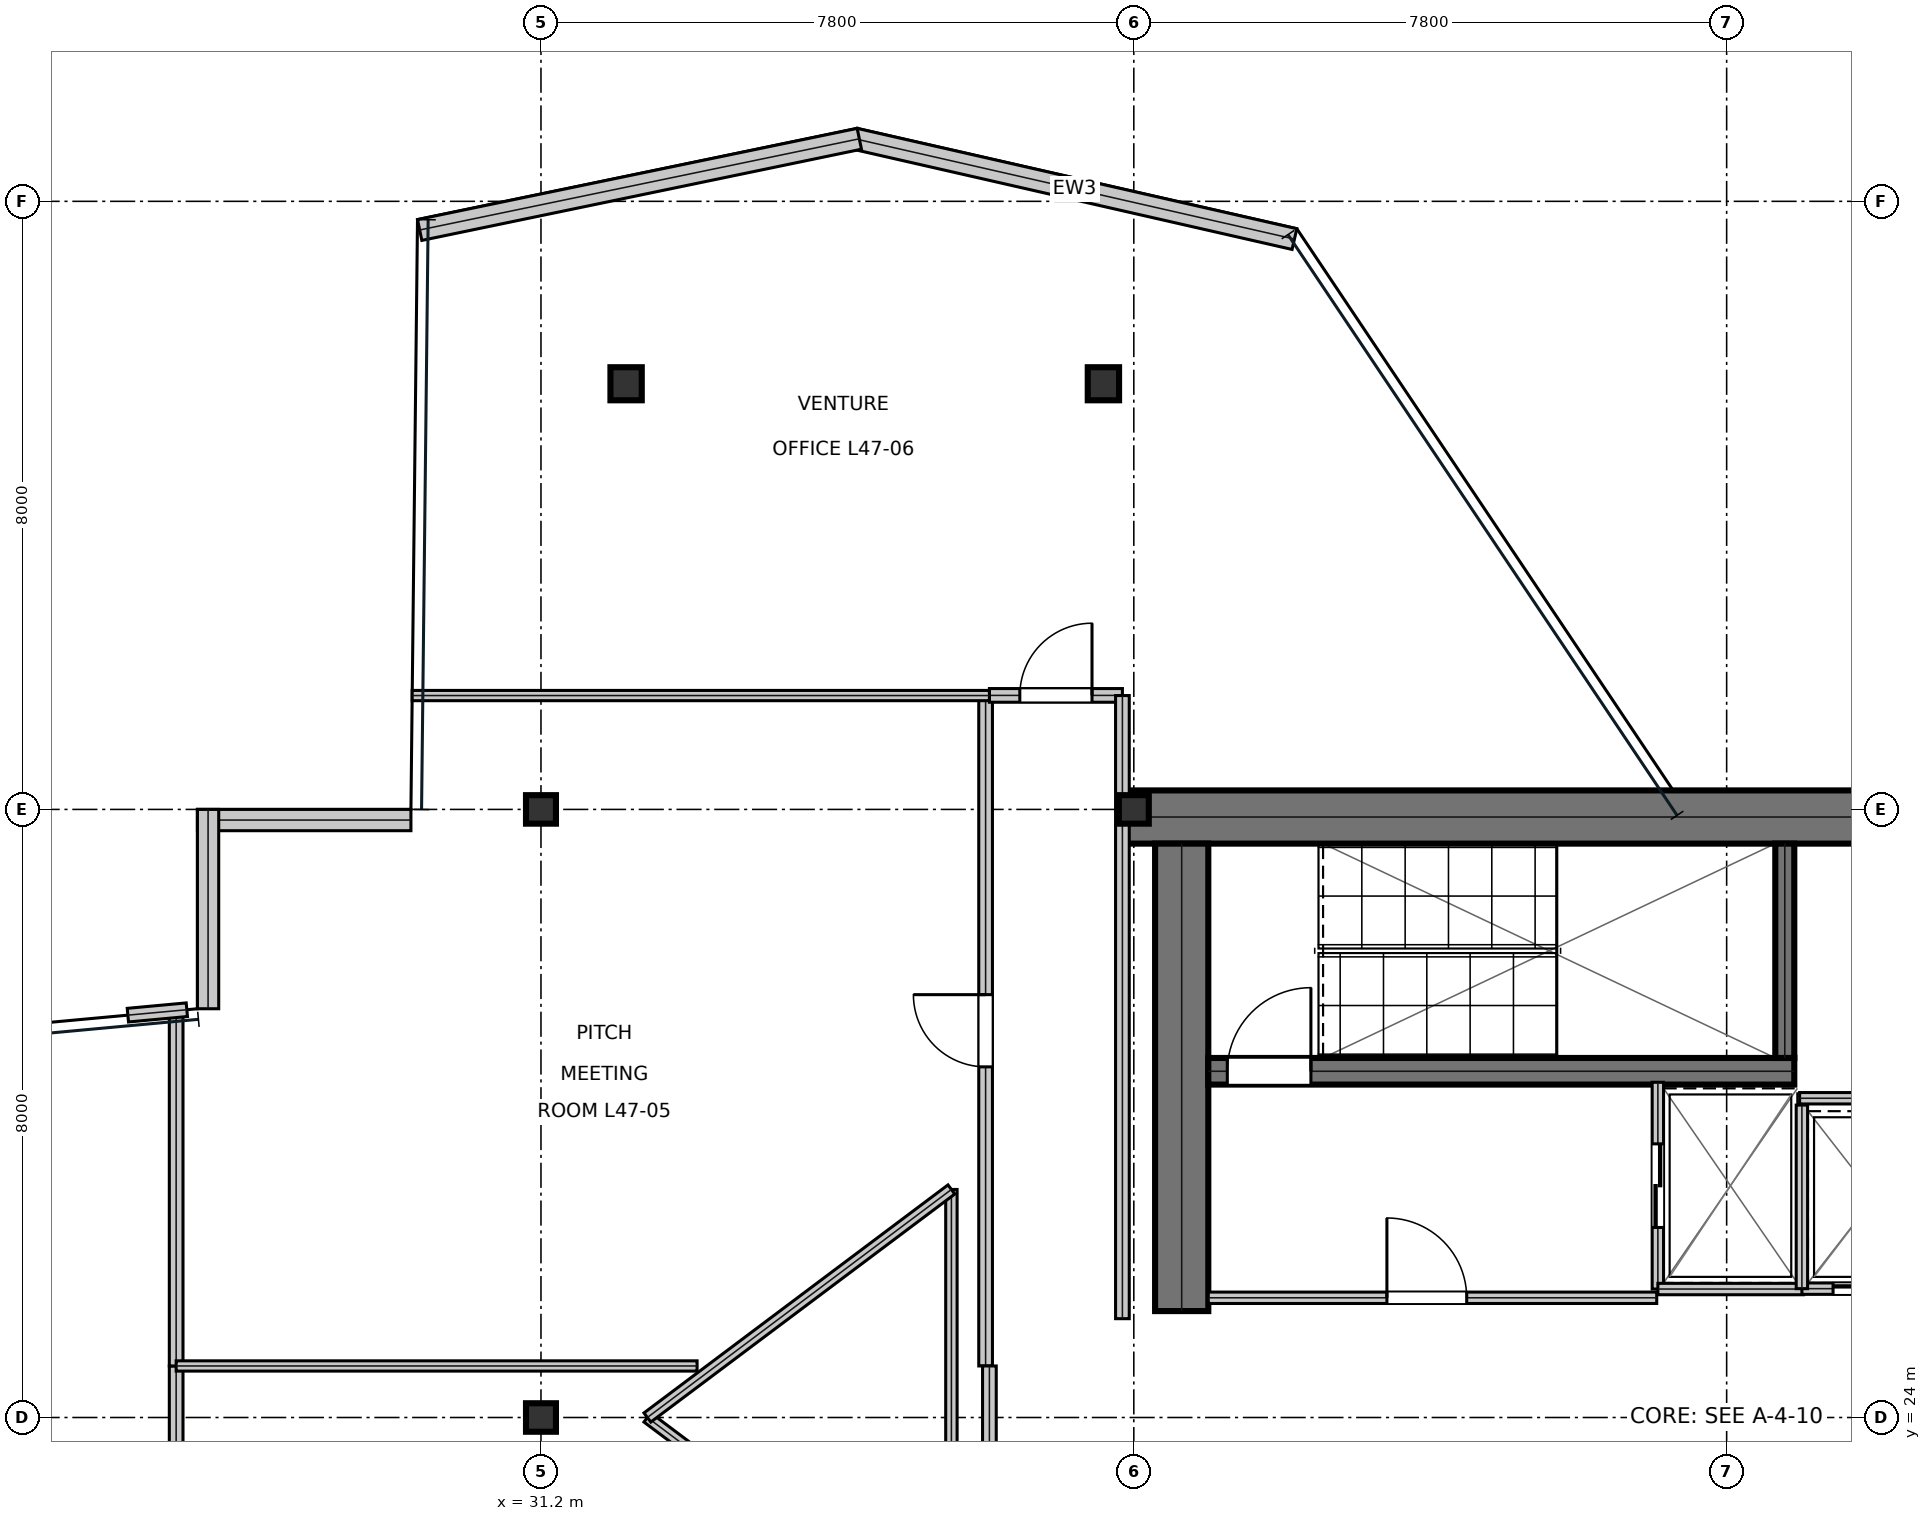
"""IFC4 building model, lengths in metres.
Left out: names, types, materials, properties, quantities, classifications, styles, units other than length and angle.
Written with IfcOpenShell. Run it as: python <this file> out.ifc"""

import sys

from ifc_helpers import new_model, si_unit, direction, frame, frame_2d, origin, origin_2d, place, context, subcontext, project, spatial, rectangle, i_section, extrude, element, fill, save


model = new_model("IFC4")
c1 = context("Model", 3, precision=1e-05, world=origin(), true_north=direction((0.0, 1.0)))
c2 = subcontext(c1, "Body", "Model", "MODEL_VIEW")
j1 = project(units=[si_unit("LENGTHUNIT", "METRE"), si_unit("PLANEANGLEUNIT", "RADIAN")], contexts=[c1])
p1 = place(None, origin())
s1 = spatial("IfcSite", under=j1, at=p1, CompositionType="ELEMENT")
p2 = place(p1, origin())
s2 = spatial("IfcBuilding", under=s1, at=p2, CompositionType="ELEMENT")
p3 = place(p2, frame((0.0, 0.0, 204.0)))
s3 = spatial("IfcBuildingStorey", under=s2, at=p3, CompositionType="ELEMENT", Elevation=204.0)
p4 = place(p3, frame((38.8, 31.9, 0.0), z_axis=(0.0, 0.0, 1.0), x_axis=(1.0, 0.0, 0.0)))
e1 = element("IfcWall", 1, at=p4, inside=s3, PredefinedType="SHEAR", context=c2, shape_type="SweptSolid", body=[
    extrude(rectangle(XDim=16.0, YDim=0.7, at=frame_2d((8.0, 0.0))), origin(), (0.0, 0.0, 1.0), 3.79),
])
p5 = place(p3, frame((39.63, 25.4, 0.0), z_axis=(0.0, 0.0, 1.0), x_axis=(0.0, 1.0, 0.0)))
e2 = element("IfcWall", 2, at=p5, inside=s3, PredefinedType="SHEAR", context=c2, shape_type="SweptSolid", body=[
    extrude(rectangle(XDim=6.15, YDim=0.7, at=frame_2d((3.075, 0.0))), origin(), (0.0, 0.0, 1.0), 3.79),
])
p6 = place(p3, frame((39.98, 28.555, 0.0), z_axis=(0.0, 0.0, 1.0), x_axis=(1.0, 0.0, 0.0)))
e3 = element("IfcWall", 3, at=p6, inside=s3, PredefinedType="SHEAR", context=c2, shape_type="SweptSolid", body=[
    extrude(rectangle(XDim=7.71, YDim=0.35, at=frame_2d((3.855, 0.0))), origin(), (0.0, 0.0, 1.0), 3.79),
])
p7 = place(p6, frame((0.25, 0.0, 0.0)))
e4 = element("IfcOpeningElement", 4, at=p7, cuts=e3, PredefinedType="OPENING", context=c2, shape_type="SweptSolid", body=[
    extrude(rectangle(XDim=1.1, YDim=2.15, at=frame_2d((0.55, 1.075))), frame((0.0, 0.185, 0.0), z_axis=(0.0, -1.0, 0.0), x_axis=(1.0, 0.0, 0.0)), (0.0, 0.0, 1.0), 0.37),
])
p8 = place(p3, frame((47.565, 28.73, 0.0), z_axis=(0.0, 0.0, 1.0), x_axis=(0.0, 1.0, 0.0)))
e5 = element("IfcWall", 5, at=p8, inside=s3, PredefinedType="SHEAR", context=c2, shape_type="SweptSolid", body=[
    extrude(rectangle(XDim=2.82, YDim=0.25, at=frame_2d((1.41, 0.0))), origin(), (0.0, 0.0, 1.0), 3.79),
])
for number, where, z_axis, x_axis in (
    (6, (31.2, 24.0, 0.0), (0.0, 0.0, 1.0), (1.0, 0.0, 0.0)),
    (7, (31.2, 32.0, 0.0), (0.0, 0.0, 1.0), (1.0, 0.0, 0.0)),
    (8, (39.0, 32.0, 0.0), (0.0, 0.0, 1.0), (1.0, 0.0, 0.0)),
):
    element("IfcColumn", number, at=place(p3, frame(where, z_axis=z_axis, x_axis=x_axis)), inside=s3, PredefinedType="COLUMN", context=c2, shape_type="SweptSolid", body=[
        extrude(i_section(OverallWidth=0.394, OverallDepth=0.375, WebThickness=0.017, FlangeThickness=0.028, at=origin_2d()), origin(), (0.0, 0.0, 1.0), 4.044),
    ])
for number, where, z_axis, x_axis in (
    (9, (32.32, 37.6, 0.016), (0.0, 0.0, 1.0), (1.0, 0.0, 0.0)),
    (10, (38.6, 37.6, 0.016), (0.0, 0.0, 1.0), (1.0, 0.0, 0.0)),
):
    element("IfcColumn", number, at=place(p3, frame(where, z_axis=z_axis, x_axis=x_axis)), inside=s3, PredefinedType="COLUMN", context=c2, shape_type="SweptSolid", body=[
        extrude(i_section(OverallWidth=0.412, OverallDepth=0.435, WebThickness=0.036, FlangeThickness=0.058, at=origin_2d()), origin(), (0.0, 0.0, 1.0), 4.018),
    ])
p9 = place(p3, frame((41.113, 39.503, 0.0), z_axis=(0.0, 0.0, 1.0), x_axis=(-0.974934808954, 0.222490715064, 0.0)))
e11 = element("IfcWall", 11, at=p9, inside=s3, PredefinedType="STANDARD", context=c2, shape_type="SweptSolid", body=[
    extrude(rectangle(XDim=5.933, YDim=0.28, at=frame_2d((2.967, 0.0))), origin(), (0.0, 0.0, 1.0), 3.79),
])
p10 = place(p3, frame((35.388, 40.823, 0.0), z_axis=(0.0, 0.0, 1.0), x_axis=(-0.979145472124, -0.203160390873, 0.0)))
e12 = element("IfcWall", 12, at=p10, inside=s3, PredefinedType="STANDARD", context=c2, shape_type="SweptSolid", body=[
    extrude(rectangle(XDim=5.908, YDim=0.28, at=frame_2d((2.954, 0.0))), origin(), (0.0, 0.0, 1.0), 3.79),
])
p11 = place(p3, frame((29.489, 31.86, 0.0), z_axis=(0.0, 0.0, 1.0), x_axis=(-1.0, 0.0, 0.0)))
e13 = element("IfcWall", 13, at=p11, inside=s3, PredefinedType="STANDARD", context=c2, shape_type="SweptSolid", body=[
    extrude(rectangle(XDim=2.809, YDim=0.28, at=frame_2d((1.405, 0.0))), origin(), (0.0, 0.0, 1.0), 3.79),
])
p12 = place(p3, frame((26.82, 32.0, 0.0), z_axis=(0.0, 0.0, 1.0), x_axis=(0.0, -1.0, 0.0)))
e14 = element("IfcWall", 14, at=p12, inside=s3, PredefinedType="STANDARD", context=c2, shape_type="SweptSolid", body=[
    extrude(rectangle(XDim=2.622, YDim=0.28, at=frame_2d((1.311, 0.0))), origin(), (0.0, 0.0, 1.0), 3.319),
])
p13 = place(p3, frame((39.98, 25.575, 0.0), z_axis=(0.0, 0.0, 1.0), x_axis=(1.0, 0.0, 0.0)))
e15 = element("IfcWall", 15, at=p13, inside=s3, PredefinedType="PARTITIONING", context=c2, shape_type="SweptSolid", body=[
    extrude(rectangle(XDim=5.9, YDim=0.15, at=frame_2d((2.95, 0.0))), origin(), (0.0, 0.0, 1.0), 3.79),
])
p14 = place(p13, frame((2.35, 0.0, 0.0)))
e16 = element("IfcOpeningElement", 16, at=p14, cuts=e15, PredefinedType="OPENING", context=c2, shape_type="SweptSolid", body=[
    extrude(rectangle(XDim=1.05, YDim=2.15, at=frame_2d((0.525, 1.075))), frame((0.0, 0.085, 0.0), z_axis=(0.0, -1.0, 0.0), x_axis=(1.0, 0.0, 0.0)), (0.0, 0.0, 1.0), 0.17),
])
p15 = place(p3, frame((45.895, 25.69, 0.0), z_axis=(0.0, 0.0, 1.0), x_axis=(0.0, 1.0, 0.0)))
e17 = element("IfcWall", 17, at=p15, inside=s3, PredefinedType="PARTITIONING", context=c2, shape_type="SweptSolid", body=[
    extrude(rectangle(XDim=2.72, YDim=0.15, at=frame_2d((1.36, 0.0))), origin(), (0.0, 0.0, 1.0), 3.79),
])
p16 = place(p15, frame((0.81, 0.0, 0.0)))
e18 = element("IfcOpeningElement", 18, at=p16, cuts=e17, PredefinedType="OPENING", context=c2, shape_type="SweptSolid", body=[
    extrude(rectangle(XDim=1.1, YDim=2.15, at=frame_2d((0.55, 1.075))), frame((0.0, 0.085, 0.0), z_axis=(0.0, -1.0, 0.0), x_axis=(1.0, 0.0, 0.0)), (0.0, 0.0, 1.0), 0.17),
])
p17 = place(p3, frame((45.895, 25.69, 0.0), z_axis=(0.0, 0.0, 1.0), x_axis=(1.0, 0.0, 0.0)))
e19 = element("IfcWall", 19, at=p17, inside=s3, PredefinedType="PARTITIONING", context=c2, shape_type="SweptSolid", body=[
    extrude(rectangle(XDim=1.915, YDim=0.15, at=frame_2d((0.958, 0.0))), origin(), (0.0, 0.0, 1.0), 3.79),
])
p18 = place(p3, frame((47.79, 25.695, 0.0), z_axis=(0.0, 0.0, 1.0), x_axis=(1.0, 0.0, 0.0)))
e20 = element("IfcWall", 20, at=p18, inside=s3, PredefinedType="PARTITIONING", context=c2, shape_type="SweptSolid", body=[
    extrude(rectangle(XDim=1.92, YDim=0.15, at=frame_2d((0.96, 0.0))), origin(), (0.0, 0.0, 1.0), 3.79),
])
p19 = place(p18, frame((0.41, 0.0, 0.0)))
e21 = element("IfcOpeningElement", 21, at=p19, cuts=e20, PredefinedType="OPENING", context=c2, shape_type="SweptSolid", body=[
    extrude(rectangle(XDim=1.1, YDim=2.15, at=frame_2d((0.55, 1.075))), frame((0.0, 0.085, 0.0), z_axis=(0.0, -1.0, 0.0), x_axis=(1.0, 0.0, 0.0)), (0.0, 0.0, 1.0), 0.17),
])
p20 = place(p3, frame((47.79, 25.695, 0.0), z_axis=(0.0, 0.0, 1.0), x_axis=(0.0, 1.0, 0.0)))
e22 = element("IfcWall", 22, at=p20, inside=s3, PredefinedType="PARTITIONING", context=c2, shape_type="SweptSolid", body=[
    extrude(rectangle(XDim=2.415, YDim=0.15, at=frame_2d((1.208, 0.0))), origin(), (0.0, 0.0, 1.0), 3.79),
])
p21 = place(p3, frame((47.76, 28.2, 0.0), z_axis=(0.0, 0.0, 1.0), x_axis=(1.0, 0.0, 0.0)))
e23 = element("IfcWall", 23, at=p21, inside=s3, PredefinedType="PARTITIONING", context=c2, shape_type="SweptSolid", body=[
    extrude(rectangle(XDim=2.04, YDim=0.15, at=frame_2d((1.02, 0.0))), origin(), (0.0, 0.0, 1.0), 3.79),
])
p22 = place(p3, frame((37.05, 24.678, 0.0), z_axis=(0.0, 0.0, 1.0), x_axis=(0.0, 1.0, 0.0)))
e24 = element("IfcWall", 24, at=p22, inside=s3, PredefinedType="SOLIDWALL", context=c2, shape_type="SweptSolid", body=[
    extrude(rectangle(XDim=8.82, YDim=0.18, at=frame_2d((4.41, 0.0))), origin(), (0.0, 0.0, 1.0), 3.241),
])
p23 = place(p22, frame((3.935, 0.0, 0.0)))
e25 = element("IfcOpeningElement", 25, at=p23, cuts=e24, PredefinedType="OPENING", context=c2, shape_type="SweptSolid", body=[
    extrude(rectangle(XDim=0.95, YDim=2.15, at=frame_2d((0.475, 1.075))), frame((0.0, 0.1, 0.0), z_axis=(0.0, -1.0, 0.0), x_axis=(1.0, 0.0, 0.0)), (0.0, 0.0, 1.0), 0.2),
])
p24 = place(p3, frame((37.1, 33.5, 0.0), z_axis=(0.0, 0.0, 1.0), x_axis=(1.0, 0.0, 0.0)))
e26 = element("IfcWall", 26, at=p24, inside=s3, PredefinedType="SOLIDWALL", context=c2, shape_type="SweptSolid", body=[
    extrude(rectangle(XDim=1.75, YDim=0.18, at=frame_2d((0.875, 0.0))), origin(), (0.0, 0.0, 1.0), 3.241),
])
p25 = place(p24, frame((0.4, 0.0, 0.0)))
e27 = element("IfcOpeningElement", 27, at=p25, cuts=e26, PredefinedType="OPENING", context=c2, shape_type="SweptSolid", body=[
    extrude(rectangle(XDim=0.95, YDim=2.15, at=frame_2d((0.475, 1.075))), frame((0.0, 0.1, 0.0), z_axis=(0.0, -1.0, 0.0), x_axis=(1.0, 0.0, 0.0)), (0.0, 0.0, 1.0), 0.2),
])
p26 = place(p3, frame((26.4, 20.6, 0.0), z_axis=(0.0, 0.0, 1.0), x_axis=(0.0, 1.0, 0.0)))
e28 = element("IfcWall", 28, at=p26, inside=s3, PredefinedType="SOLIDWALL", context=c2, shape_type="SweptSolid", body=[
    extrude(rectangle(XDim=4.078, YDim=0.18, at=frame_2d((2.039, 0.0))), origin(), (0.0, 0.0, 1.0), 3.241),
])
p27 = place(p3, frame((37.1, 20.6, 0.0), z_axis=(0.0, 0.0, 1.0), x_axis=(0.0, 1.0, 0.0)))
e29 = element("IfcWall", 29, at=p27, inside=s3, PredefinedType="SOLIDWALL", context=c2, shape_type="SweptSolid", body=[
    extrude(rectangle(XDim=4.078, YDim=0.18, at=frame_2d((2.039, 0.0))), origin(), (0.0, 0.0, 1.0), 3.79),
])
p28 = place(p3, frame((26.4, 24.678, 0.0), z_axis=(0.0, 0.0, 1.0), x_axis=(0.0, 1.0, 0.0)))
e30 = element("IfcWall", 30, at=p28, inside=s3, PredefinedType="SOLIDWALL", context=c2, shape_type="SweptSolid", body=[
    extrude(rectangle(XDim=4.674, YDim=0.18, at=frame_2d((2.337, 0.0))), origin(), (0.0, 0.0, 1.0), 3.241),
])
p29 = place(p3, frame((25.765, 29.293, 0.0), z_axis=(0.0, 0.0, 1.0), x_axis=(0.995774178655, 0.091835641909, 0.0)))
e31 = element("IfcWall", 31, at=p29, inside=s3, PredefinedType="SOLIDWALL", context=c2, shape_type="SweptSolid", body=[
    extrude(rectangle(XDim=0.779, YDim=0.18, at=frame_2d((0.389, 0.0))), origin(), (0.0, 0.0, 1.0), 3.79),
])
p30 = place(p3, frame((38.85, 25.3, 0.0), z_axis=(0.0, 0.0, 1.0), x_axis=(0.0, 1.0, 0.0)))
e32 = element("IfcWall", 32, at=p30, inside=s3, PredefinedType="SOLIDWALL", context=c2, shape_type="SweptSolid", body=[
    extrude(rectangle(XDim=8.198, YDim=0.18, at=frame_2d((4.099, 0.0))), origin(), (0.0, 0.0, 1.0), 3.241),
])
p31 = place(p3, frame((26.4, 24.678, 0.0), z_axis=(0.0, 0.0, 1.0), x_axis=(1.0, 0.0, 0.0)))
e33 = element("IfcWall", 33, at=p31, inside=s3, PredefinedType="PARTITIONING", context=c2, shape_type="SweptSolid", body=[
    extrude(rectangle(XDim=6.854, YDim=0.135, at=frame_2d((3.427, 0.0))), origin(), (0.0, 0.0, 1.0), 3.241),
])
p32 = place(p3, frame((29.506, 33.498, 0.0), z_axis=(0.0, 0.0, 1.0), x_axis=(1.0, 0.0, 0.0)))
e34 = element("IfcWall", 34, at=p32, inside=s3, PredefinedType="PARTITIONING", context=c2, shape_type="SweptSolid", body=[
    extrude(rectangle(XDim=7.594, YDim=0.135, at=frame_2d((3.797, 0.0))), origin(), (0.0, 0.0, 1.0), 3.319),
])
p33 = place(p3, frame((32.6, 24.0, 0.0), z_axis=(0.0, 0.0, 1.0), x_axis=(0.8, -0.6, 0.0)))
e35 = element("IfcWall", 35, at=p33, inside=s3, PredefinedType="MOVABLE", context=c2, shape_type="SweptSolid", body=[
    extrude(rectangle(XDim=5.0, YDim=0.15, at=frame_2d((2.5, 0.0))), origin(), (0.0, 0.0, 1.0), 3.79),
])
p34 = place(p3, frame((36.6, 21.0, 0.0), z_axis=(0.0, 0.0, 1.0), x_axis=(0.0, 1.0, 0.0)))
e36 = element("IfcWall", 36, at=p34, inside=s3, PredefinedType="MOVABLE", context=c2, shape_type="SweptSolid", body=[
    extrude(rectangle(XDim=6.0, YDim=0.15, at=frame_2d((3.0, 0.0))), origin(), (0.0, 0.0, 1.0), 3.79),
])
p35 = place(p3, frame((36.6, 27.0, 0.0), z_axis=(0.0, 0.0, 1.0), x_axis=(-0.8, -0.6, 0.0)))
e37 = element("IfcWall", 37, at=p35, inside=s3, PredefinedType="MOVABLE", context=c2, shape_type="SweptSolid", body=[
    extrude(rectangle(XDim=5.0, YDim=0.15, at=frame_2d((2.5, 0.0))), origin(), (0.0, 0.0, 1.0), 3.79),
])
p36 = place(p14, origin())
e38 = element("IfcDoor", 38, at=p36, inside=s3, OperationType="SINGLE_SWING_LEFT", PredefinedType="DOOR", context=c2, shape_type="SweptSolid", body=[
    extrude(rectangle(XDim=1.05, YDim=2.15, at=frame_2d((0.525, 1.075))), frame((0.0, 0.025, 0.0), z_axis=(0.0, -1.0, 0.0), x_axis=(1.0, 0.0, 0.0)), (0.0, 0.0, 1.0), 0.05),
])
fill(e16, e38)
p37 = place(p16, frame((1.1, 0.0, 0.0), z_axis=(0.0, 0.0, 1.0), x_axis=(-1.0, 0.0, 0.0)))
e39 = element("IfcDoor", 39, at=p37, inside=s3, OperationType="DOUBLE_DOOR_SLIDING", PredefinedType="DOOR", context=c2, shape_type="SweptSolid", body=[
    extrude(rectangle(XDim=1.1, YDim=2.15, at=frame_2d((0.55, 1.075))), frame((0.0, 0.025, 0.0), z_axis=(0.0, -1.0, 0.0), x_axis=(1.0, 0.0, 0.0)), (0.0, 0.0, 1.0), 0.05),
])
fill(e18, e39)
p38 = place(p19, frame((1.1, 0.0, 0.0), z_axis=(0.0, 0.0, 1.0), x_axis=(-1.0, 0.0, 0.0)))
e40 = element("IfcDoor", 40, at=p38, inside=s3, OperationType="DOUBLE_DOOR_SLIDING", PredefinedType="DOOR", context=c2, shape_type="SweptSolid", body=[
    extrude(rectangle(XDim=1.1, YDim=2.15, at=frame_2d((0.55, 1.075))), frame((0.0, 0.025, 0.0), z_axis=(0.0, -1.0, 0.0), x_axis=(1.0, 0.0, 0.0)), (0.0, 0.0, 1.0), 0.05),
])
fill(e21, e40)
p39 = place(p23, origin())
e41 = element("IfcDoor", 41, at=p39, inside=s3, OperationType="SINGLE_SWING_RIGHT", PredefinedType="DOOR", context=c2, shape_type="SweptSolid", body=[
    extrude(rectangle(XDim=0.95, YDim=2.15, at=frame_2d((0.475, 1.075))), frame((0.0, 0.025, 0.0), z_axis=(0.0, -1.0, 0.0), x_axis=(1.0, 0.0, 0.0)), (0.0, 0.0, 1.0), 0.05),
])
fill(e25, e41)
p40 = place(p25, origin())
e42 = element("IfcDoor", 42, at=p40, inside=s3, OperationType="SINGLE_SWING_RIGHT", PredefinedType="DOOR", context=c2, shape_type="SweptSolid", body=[
    extrude(rectangle(XDim=0.95, YDim=2.15, at=frame_2d((0.475, 1.075))), frame((0.0, 0.025, 0.0), z_axis=(0.0, -1.0, 0.0), x_axis=(1.0, 0.0, 0.0)), (0.0, 0.0, 1.0), 0.05),
])
fill(e27, e42)
p41 = place(p7, origin())
e43 = element("IfcDoor", 43, at=p41, inside=s3, OperationType="SINGLE_SWING_RIGHT", PredefinedType="DOOR", context=c2, shape_type="SweptSolid", body=[
    extrude(rectangle(XDim=1.1, YDim=2.15, at=frame_2d((0.55, 1.075))), frame((0.0, 0.025, 0.0), z_axis=(0.0, -1.0, 0.0), x_axis=(1.0, 0.0, 0.0)), (0.0, 0.0, 1.0), 0.05),
])
fill(e4, e43)
save(model, sys.argv[1])
